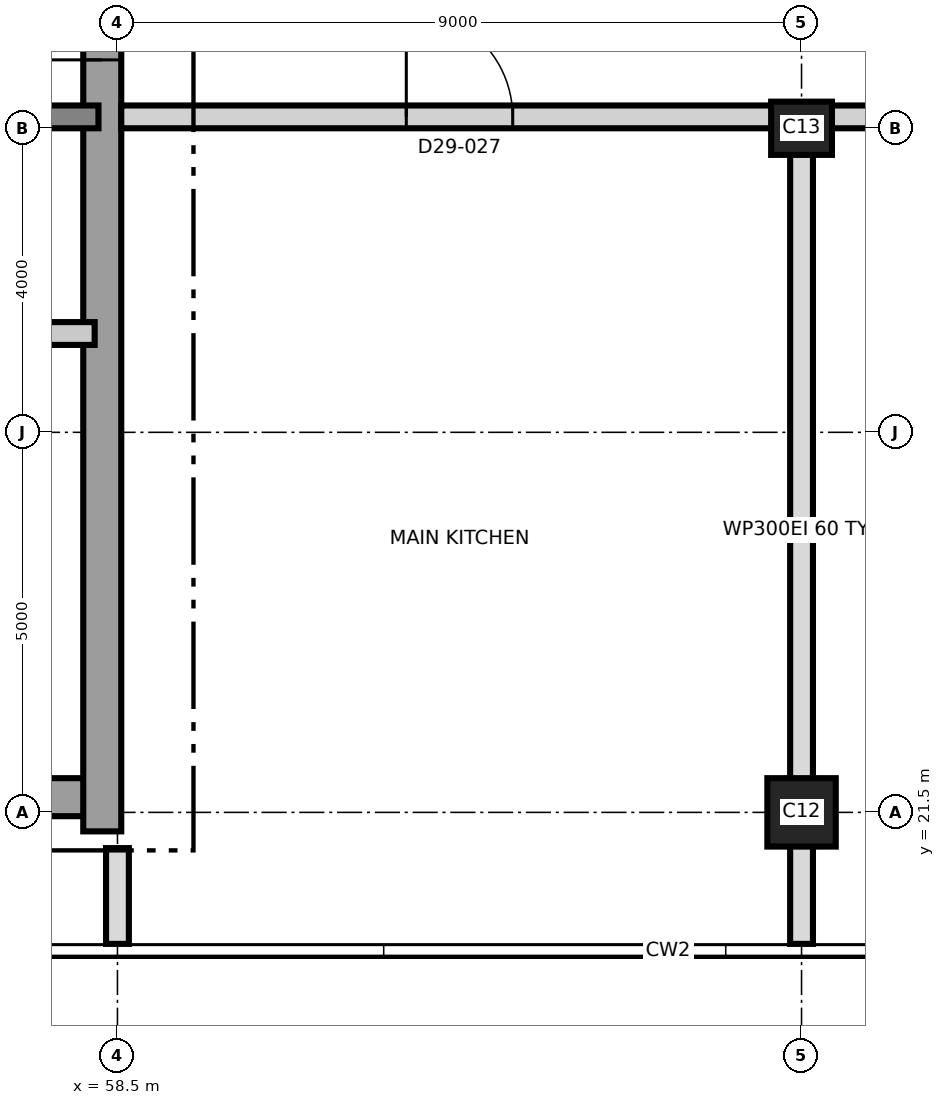
"""IFC4 building model, lengths in metres.
Left out: names, types, materials, properties, quantities, classifications, styles, units other than length and angle.
Written with IfcOpenShell. Run it as: python <this file> out.ifc"""

import sys

from ifc_helpers import new_model, si_unit, direction, frame, frame_2d, origin, origin_2d, place, context, subcontext, project, spatial, rectangle, extrude, element, fill, save


model = new_model("IFC4")
c1 = context("Model", 3, precision=1e-05, world=origin(), true_north=direction((0.0, 1.0)))
c2 = subcontext(c1, "Body", "Model", "MODEL_VIEW")
j1 = project(units=[si_unit("LENGTHUNIT", "METRE"), si_unit("PLANEANGLEUNIT", "RADIAN")], contexts=[c1])
p1 = place(None, origin())
s1 = spatial("IfcSite", under=j1, at=p1, CompositionType="ELEMENT")
p2 = place(p1, origin())
s2 = spatial("IfcBuilding", under=s1, at=p2, CompositionType="ELEMENT")
p3 = place(p2, frame((0.0, 0.0, 254.9)))
s3 = spatial("IfcBuildingStorey", under=s2, at=p3, CompositionType="ELEMENT", Elevation=254.9)
p4 = place(p3, frame((31.25, 21.7, 0.0), z_axis=(0.0, 0.0, 1.0), x_axis=(1.0, 0.0, 0.0)))
e1 = element("IfcWall", 1, at=p4, inside=s3, PredefinedType="SHEAR", context=c2, shape_type="SweptSolid", body=[
    extrude(rectangle(XDim=27.0, YDim=0.5, at=frame_2d((13.5, 0.0))), origin(), (0.0, 0.0, 1.0), 6.0),
])
p5 = place(p3, frame((58.3, 21.25, 0.0), z_axis=(0.0, 0.0, 1.0), x_axis=(0.0, 1.0, 0.0)))
e2 = element("IfcWall", 2, at=p5, inside=s3, PredefinedType="SHEAR", context=c2, shape_type="SweptSolid", body=[
    extrude(rectangle(XDim=18.5, YDim=0.5, at=frame_2d((9.25, 0.0))), origin(), (0.0, 0.0, 1.0), 6.0),
])
p6 = place(p5, frame((10.15, 0.0, 0.0)))
e3 = element("IfcOpeningElement", 3, at=p6, cuts=e2, PredefinedType="OPENING", context=c2, shape_type="SweptSolid", body=[
    extrude(rectangle(XDim=1.2, YDim=2.1, at=frame_2d((0.6, 1.05))), frame((0.0, 0.26, 0.0), z_axis=(0.0, -1.0, 0.0), x_axis=(1.0, 0.0, 0.0)), (0.0, 0.0, 1.0), 0.52),
])
p7 = place(p3, frame((31.75, 30.65, 0.0), z_axis=(0.0, 0.0, 1.0), x_axis=(1.0, 0.0, 0.0)))
e4 = element("IfcWall", 4, at=p7, inside=s3, PredefinedType="SHEAR", context=c2, shape_type="SweptSolid", body=[
    extrude(rectangle(XDim=26.5, YDim=0.3, at=frame_2d((13.25, 0.0))), origin(), (0.0, 0.0, 1.0), 6.0),
])
p8 = place(p7, frame((24.75, 0.0, 0.0)))
e5 = element("IfcOpeningElement", 5, at=p8, cuts=e4, PredefinedType="OPENING", context=c2, shape_type="SweptSolid", body=[
    extrude(rectangle(XDim=1.0, YDim=2.1, at=frame_2d((0.5, 1.05))), frame((0.0, 0.16, 0.0), z_axis=(0.0, -1.0, 0.0), x_axis=(1.0, 0.0, 0.0)), (0.0, 0.0, 1.0), 0.32),
])
p9 = place(p7, frame((11.55, 0.0, 0.0)))
e6 = element("IfcOpeningElement", 6, at=p9, cuts=e4, PredefinedType="OPENING", context=c2, shape_type="SweptSolid", body=[
    extrude(rectangle(XDim=1.0, YDim=2.1, at=frame_2d((0.5, 1.05))), frame((0.0, 0.16, 0.0), z_axis=(0.0, -1.0, 0.0), x_axis=(1.0, 0.0, 0.0)), (0.0, 0.0, 1.0), 0.32),
])
p10 = place(p3, frame((67.5, 21.5, 0.0), z_axis=(0.0, 0.0, 1.0), x_axis=(1.0, 0.0, 0.0)))
e7 = element("IfcColumn", 7, at=p10, inside=s3, PredefinedType="COLUMN", context=c2, shape_type="SweptSolid", body=[
    extrude(rectangle(XDim=0.9, YDim=0.9, at=origin_2d()), origin(), (0.0, 0.0, 1.0), 6.0),
])
p11 = place(p3, frame((67.5, 30.5, 0.0), z_axis=(0.0, 0.0, 1.0), x_axis=(1.0, 0.0, 0.0)))
e8 = element("IfcColumn", 8, at=p11, inside=s3, PredefinedType="COLUMN", context=c2, shape_type="SweptSolid", body=[
    extrude(rectangle(XDim=0.8, YDim=0.7, at=origin_2d()), origin(), (0.0, 0.0, 1.0), 6.0),
])
p12 = place(p3, frame((55.8, 27.8, 0.0), z_axis=(0.0, 0.0, 1.0), x_axis=(1.0, 0.0, 0.0)))
e9 = element("IfcWall", 9, at=p12, inside=s3, PredefinedType="PARTITIONING", context=c2, shape_type="SweptSolid", body=[
    extrude(rectangle(XDim=2.4, YDim=0.3, at=frame_2d((1.2, 0.0))), origin(), (0.0, 0.0, 1.0), 5.7),
])
p13 = place(p12, frame((0.75, 0.0, 0.0)))
e10 = element("IfcOpeningElement", 10, at=p13, cuts=e9, PredefinedType="OPENING", context=c2, shape_type="SweptSolid", body=[
    extrude(rectangle(XDim=0.9, YDim=2.1, at=frame_2d((0.45, 1.05))), frame((0.0, 0.16, 0.0), z_axis=(0.0, -1.0, 0.0), x_axis=(1.0, 0.0, 0.0)), (0.0, 0.0, 1.0), 0.32),
])
p14 = place(p3, frame((58.55, 30.65, 0.0), z_axis=(0.0, 0.0, 1.0), x_axis=(1.0, 0.0, 0.0)))
e11 = element("IfcWall", 11, at=p14, inside=s3, PredefinedType="PARTITIONING", context=c2, shape_type="SweptSolid", body=[
    extrude(rectangle(XDim=26.78, YDim=0.3, at=frame_2d((13.39, 0.0))), origin(), (0.0, 0.0, 1.0), 5.7),
])
p15 = place(p14, frame((3.75, 0.0, 0.0)))
e12 = element("IfcOpeningElement", 12, at=p15, cuts=e11, PredefinedType="OPENING", context=c2, shape_type="SweptSolid", body=[
    extrude(rectangle(XDim=1.4, YDim=2.1, at=frame_2d((0.7, 1.05))), frame((0.0, 0.16, 0.0), z_axis=(0.0, -1.0, 0.0), x_axis=(1.0, 0.0, 0.0)), (0.0, 0.0, 1.0), 0.32),
])
p16 = place(p14, frame((12.75, 0.0, 0.0)))
e13 = element("IfcOpeningElement", 13, at=p16, cuts=e11, PredefinedType="OPENING", context=c2, shape_type="SweptSolid", body=[
    extrude(rectangle(XDim=1.4, YDim=2.1, at=frame_2d((0.7, 1.05))), frame((0.0, 0.16, 0.0), z_axis=(0.0, -1.0, 0.0), x_axis=(1.0, 0.0, 0.0)), (0.0, 0.0, 1.0), 0.32),
])
p17 = place(p14, frame((21.85, 0.0, 0.0)))
e14 = element("IfcOpeningElement", 14, at=p17, cuts=e11, PredefinedType="OPENING", context=c2, shape_type="SweptSolid", body=[
    extrude(rectangle(XDim=1.2, YDim=2.1, at=frame_2d((0.6, 1.05))), frame((0.0, 0.16, 0.0), z_axis=(0.0, -1.0, 0.0), x_axis=(1.0, 0.0, 0.0)), (0.0, 0.0, 1.0), 0.32),
])
p18 = place(p3, frame((58.5, 19.77, 0.0), z_axis=(0.0, 0.0, 1.0), x_axis=(0.0, 1.0, 0.0)))
e15 = element("IfcWall", 15, at=p18, inside=s3, PredefinedType="PARTITIONING", context=c2, shape_type="SweptSolid", body=[
    extrude(rectangle(XDim=1.26, YDim=0.3, at=frame_2d((0.63, 0.0))), origin(), (0.0, 0.0, 1.0), 5.65),
])
p19 = place(p3, frame((67.5, 19.77, 0.0), z_axis=(0.0, 0.0, 1.0), x_axis=(0.0, 1.0, 0.0)))
e16 = element("IfcWall", 16, at=p19, inside=s3, PredefinedType="PARTITIONING", context=c2, shape_type="SweptSolid", body=[
    extrude(rectangle(XDim=10.88, YDim=0.3, at=frame_2d((5.44, 0.0))), origin(), (0.0, 0.0, 1.0), 5.65),
])
p20 = place(p6, origin())
e17 = element("IfcDoor", 17, at=p20, inside=s3, OperationType="SINGLE_SWING_LEFT", PredefinedType="DOOR", context=c2, shape_type="SweptSolid", body=[
    extrude(rectangle(XDim=1.2, YDim=2.1, at=frame_2d((0.6, 1.05))), frame((0.0, 0.025, 0.0), z_axis=(0.0, -1.0, 0.0), x_axis=(1.0, 0.0, 0.0)), (0.0, 0.0, 1.0), 0.05),
])
fill(e3, e17)
p21 = place(p15, origin())
e18 = element("IfcDoor", 18, at=p21, inside=s3, OperationType="SINGLE_SWING_LEFT", PredefinedType="DOOR", context=c2, shape_type="SweptSolid", body=[
    extrude(rectangle(XDim=1.4, YDim=2.1, at=frame_2d((0.7, 1.05))), frame((0.0, 0.025, 0.0), z_axis=(0.0, -1.0, 0.0), x_axis=(1.0, 0.0, 0.0)), (0.0, 0.0, 1.0), 0.05),
])
fill(e12, e18)
save(model, sys.argv[1])
